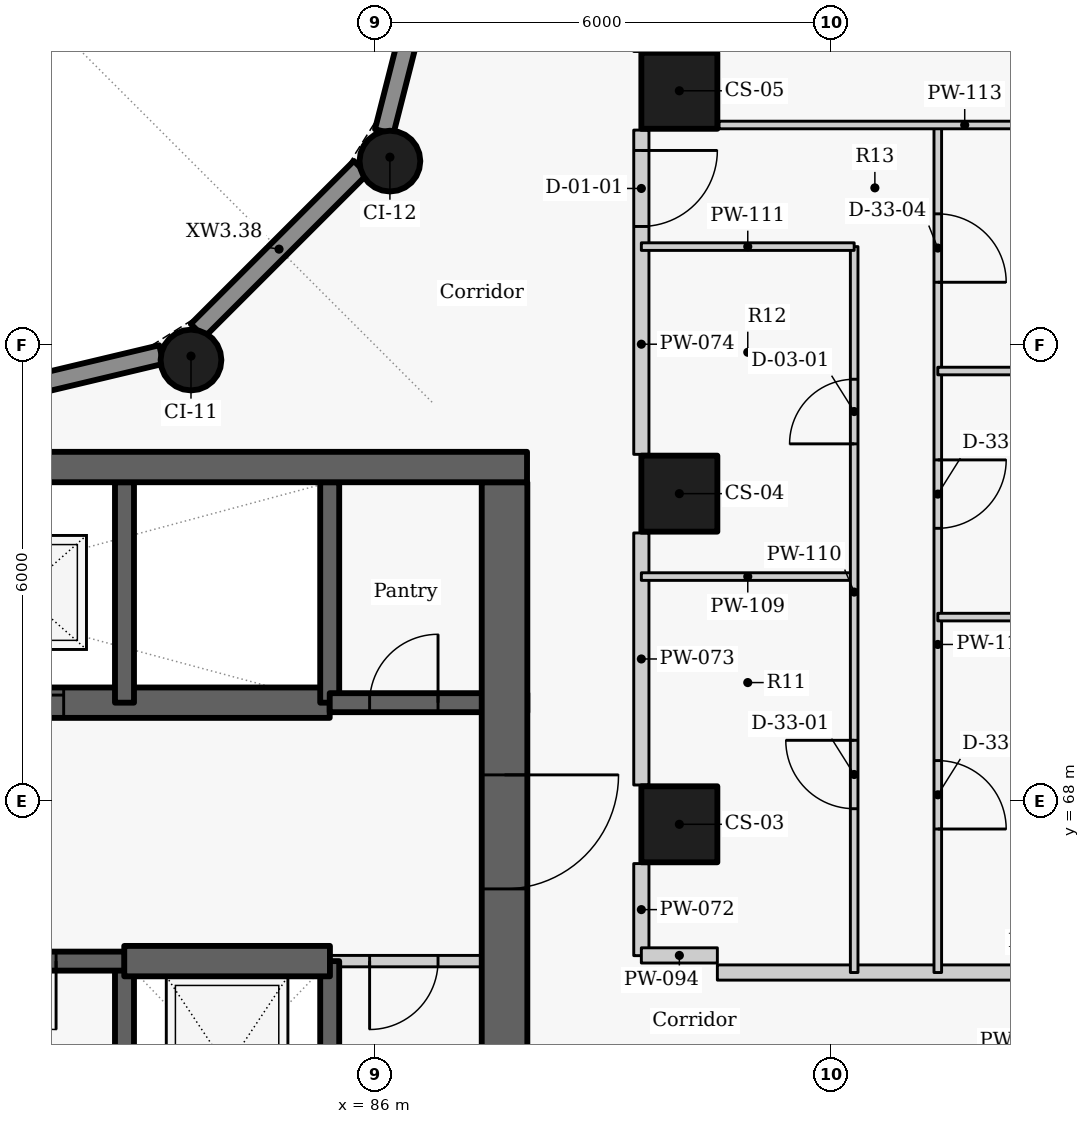
"""IFC4 building model, lengths in metres.
Left out: names, types, materials, properties, quantities, classifications, styles, units other than length and angle.
Written with IfcOpenShell. Run it as: python <this file> out.ifc"""

import sys

from ifc_helpers import new_model, si_unit, direction, frame, frame_2d, origin, origin_2d, place, context, subcontext, project, spatial, rectangle, circle, extrude, element, fill, save


model = new_model("IFC4")
c1 = context("Model", 3, precision=1e-05, world=origin(), true_north=direction((0.0, 1.0)))
c2 = subcontext(c1, "Body", "Model", "MODEL_VIEW")
j1 = project(units=[si_unit("LENGTHUNIT", "METRE"), si_unit("PLANEANGLEUNIT", "RADIAN")], contexts=[c1])
p1 = place(None, origin())
s1 = spatial("IfcSite", under=j1, at=p1, CompositionType="ELEMENT")
p2 = place(p1, origin())
s2 = spatial("IfcBuilding", under=s1, at=p2, CompositionType="ELEMENT")
p3 = place(p2, frame((0.0, 0.0, 107.4)))
s3 = spatial("IfcBuildingStorey", under=s2, at=p3, CompositionType="ELEMENT", Elevation=107.4)
for number, where, z_axis, x_axis in (
    (1, (90.0, 67.7, 0.0), (0.0, 0.0, 1.0), (0.0, 1.0, 0.0)),
    (2, (90.0, 72.05, 0.0), (0.0, 0.0, 1.0), (0.0, 1.0, 0.0)),
    (3, (90.0, 77.35, 0.0), (0.0, 0.0, 1.0), (0.0, 1.0, 0.0)),
):
    element("IfcColumn", number, at=place(p3, frame(where, z_axis=z_axis, x_axis=x_axis)), inside=s3, PredefinedType="COLUMN", context=c2, shape_type="SweptSolid", body=[
        extrude(rectangle(XDim=1.0, YDim=1.0, at=origin_2d()), origin(), (0.0, 0.0, 1.0), 3.3),
    ])
for number, where, z_axis, x_axis in (
    (4, (83.575, 73.808, 0.0), (0.0, 0.0, 1.0), (0.866, 0.5, 0.0)),
    (5, (86.192, 76.425, 0.0), (0.0, 0.0, 1.0), (0.5, 0.866, 0.0)),
):
    element("IfcColumn", number, at=place(p3, frame(where, z_axis=z_axis, x_axis=x_axis)), inside=s3, PredefinedType="COLUMN", context=c2, shape_type="SweptSolid", body=[
        extrude(circle(Radius=0.4, at=origin_2d()), origin(), (0.0, 0.0, 1.0), 3.3),
    ])
p4 = place(p3, frame((86.86, 79.73, 0.0), z_axis=(0.0, 0.0, 1.0), x_axis=(-0.247055971283, -0.969001211069, 0.0)))
e6 = element("IfcWall", 6, at=p4, inside=s3, PredefinedType="SOLIDWALL", context=c2, shape_type="SweptSolid", body=[
    extrude(rectangle(XDim=3.01, YDim=0.25, at=frame_2d((1.505, 0.0))), origin(), (0.0, 0.0, 1.0), 2.425),
])
p5 = place(p3, frame((85.806, 76.339, 0.0), z_axis=(0.0, 0.0, 1.0), x_axis=(-0.707106781187, -0.707106781187, 0.0)))
e7 = element("IfcWall", 7, at=p5, inside=s3, PredefinedType="SOLIDWALL", context=c2, shape_type="SweptSolid", body=[
    extrude(rectangle(XDim=3.033, YDim=0.25, at=frame_2d((1.517, 0.0))), origin(), (0.0, 0.0, 1.0), 2.425),
])
p6 = place(p3, frame((83.186, 73.881, 0.0), z_axis=(0.0, 0.0, 1.0), x_axis=(-0.972773113459, -0.231759508395, 0.0)))
e8 = element("IfcWall", 8, at=p6, inside=s3, PredefinedType="SOLIDWALL", context=c2, shape_type="SweptSolid", body=[
    extrude(rectangle(XDim=3.246, YDim=0.25, at=frame_2d((1.623, 0.0))), origin(), (0.0, 0.0, 1.0), 2.425),
])
p7 = place(p3, frame((74.6, 69.3, -0.275), z_axis=(0.0, 0.0, 1.0), x_axis=(1.0, 0.0, 0.0)))
e9 = element("IfcWall", 9, at=p7, inside=s3, PredefinedType="SHEAR", context=c2, shape_type="SweptSolid", body=[
    extrude(rectangle(XDim=10.8, YDim=0.4, at=frame_2d((5.4, 0.0))), origin(), (0.0, 0.0, 1.0), 3.3),
])
p8 = place(p7, frame((0.8, 0.0, 0.275)))
e10 = element("IfcOpeningElement", 10, at=p8, cuts=e9, PredefinedType="OPENING", context=c2, shape_type="SweptSolid", body=[
    extrude(rectangle(XDim=1.1, YDim=2.1, at=frame_2d((0.55, 1.05))), frame((0.0, 0.21, 0.0), z_axis=(0.0, -1.0, 0.0), x_axis=(1.0, 0.0, 0.0)), (0.0, 0.0, 1.0), 0.42),
])
p9 = place(p7, frame((3.5, 0.0, 0.275)))
e11 = element("IfcOpeningElement", 11, at=p9, cuts=e9, PredefinedType="OPENING", context=c2, shape_type="SweptSolid", body=[
    extrude(rectangle(XDim=1.1, YDim=2.1, at=frame_2d((0.55, 1.05))), frame((0.0, 0.21, 0.0), z_axis=(0.0, -1.0, 0.0), x_axis=(1.0, 0.0, 0.0)), (0.0, 0.0, 1.0), 0.42),
])
p10 = place(p7, frame((6.2, 0.0, 0.275)))
e12 = element("IfcOpeningElement", 12, at=p10, cuts=e9, PredefinedType="OPENING", context=c2, shape_type="SweptSolid", body=[
    extrude(rectangle(XDim=1.1, YDim=2.1, at=frame_2d((0.55, 1.05))), frame((0.0, 0.21, 0.0), z_axis=(0.0, -1.0, 0.0), x_axis=(1.0, 0.0, 0.0)), (0.0, 0.0, 1.0), 0.42),
])
p11 = place(p3, frame((82.7, 63.1, -0.275), z_axis=(0.0, 0.0, 1.0), x_axis=(0.0, 1.0, 0.0)))
e13 = element("IfcWall", 13, at=p11, inside=s3, PredefinedType="SHEAR", context=c2, shape_type="SweptSolid", body=[
    extrude(rectangle(XDim=2.8, YDim=0.25, at=frame_2d((1.4, 0.0))), origin(), (0.0, 0.0, 1.0), 3.3),
])
p12 = place(p3, frame((82.7, 69.3, -0.275), z_axis=(0.0, 0.0, 1.0), x_axis=(0.0, 1.0, 0.0)))
e14 = element("IfcWall", 14, at=p12, inside=s3, PredefinedType="SHEAR", context=c2, shape_type="SweptSolid", body=[
    extrude(rectangle(XDim=2.9, YDim=0.25, at=frame_2d((1.45, 0.0))), origin(), (0.0, 0.0, 1.0), 3.3),
])
p13 = place(p3, frame((85.4, 63.1, -0.275), z_axis=(0.0, 0.0, 1.0), x_axis=(0.0, 1.0, 0.0)))
e15 = element("IfcWall", 15, at=p13, inside=s3, PredefinedType="SHEAR", context=c2, shape_type="SweptSolid", body=[
    extrude(rectangle(XDim=2.8, YDim=0.25, at=frame_2d((1.4, 0.0))), origin(), (0.0, 0.0, 1.0), 3.3),
])
p14 = place(p3, frame((85.4, 69.3, -0.275), z_axis=(0.0, 0.0, 1.0), x_axis=(0.0, 1.0, 0.0)))
e16 = element("IfcWall", 16, at=p14, inside=s3, PredefinedType="SHEAR", context=c2, shape_type="SweptSolid", body=[
    extrude(rectangle(XDim=2.9, YDim=0.25, at=frame_2d((1.45, 0.0))), origin(), (0.0, 0.0, 1.0), 3.3),
])
p15 = place(p3, frame((85.4, 69.3, -0.275), z_axis=(0.0, 0.0, 1.0), x_axis=(1.0, 0.0, 0.0)))
e17 = element("IfcWall", 17, at=p15, inside=s3, PredefinedType="SHEAR", context=c2, shape_type="SweptSolid", body=[
    extrude(rectangle(XDim=2.6, YDim=0.25, at=frame_2d((1.3, 0.0))), origin(), (0.0, 0.0, 1.0), 3.3),
])
p16 = place(p15, frame((0.525, 0.0, 0.275)))
e18 = element("IfcOpeningElement", 18, at=p16, cuts=e17, PredefinedType="OPENING", context=c2, shape_type="SweptSolid", body=[
    extrude(rectangle(XDim=0.9, YDim=2.1, at=frame_2d((0.45, 1.05))), frame((0.0, 0.135, 0.0), z_axis=(0.0, -1.0, 0.0), x_axis=(1.0, 0.0, 0.0)), (0.0, 0.0, 1.0), 0.27),
])
p17 = place(p3, frame((87.7, 72.2, -0.275), z_axis=(0.0, 0.0, 1.0), x_axis=(0.0, -1.0, 0.0)))
e19 = element("IfcWall", 19, at=p17, inside=s3, PredefinedType="SHEAR", context=c2, shape_type="SweptSolid", body=[
    extrude(rectangle(XDim=15.6, YDim=0.6, at=frame_2d((7.8, 0.0))), origin(), (0.0, 0.0, 1.0), 3.3),
])
p18 = place(p17, frame((3.85, 0.0, 0.275)))
e20 = element("IfcOpeningElement", 20, at=p18, cuts=e19, PredefinedType="OPENING", context=c2, shape_type="SweptSolid", body=[
    extrude(rectangle(XDim=1.5, YDim=2.1, at=frame_2d((0.75, 1.05))), frame((0.0, 0.31, 0.0), z_axis=(0.0, -1.0, 0.0), x_axis=(1.0, 0.0, 0.0)), (0.0, 0.0, 1.0), 0.62),
])
p19 = place(p17, frame((11.8, 0.0, 0.275)))
e21 = element("IfcOpeningElement", 21, at=p19, cuts=e19, PredefinedType="OPENING", context=c2, shape_type="SweptSolid", body=[
    extrude(rectangle(XDim=1.1, YDim=2.1, at=frame_2d((0.55, 1.05))), frame((0.0, 0.31, 0.0), z_axis=(0.0, -1.0, 0.0), x_axis=(1.0, 0.0, 0.0)), (0.0, 0.0, 1.0), 0.62),
])
p20 = place(p3, frame((88.0, 65.9, 0.0), z_axis=(0.0, 0.0, 1.0), x_axis=(-1.0, 0.0, 0.0)))
e22 = element("IfcWall", 22, at=p20, inside=s3, PredefinedType="PARTITIONING", context=c2, shape_type="SweptSolid", body=[
    extrude(rectangle(XDim=2.603, YDim=0.15, at=frame_2d((1.302, 0.0))), origin(), (0.0, 0.0, 1.0), 3.025),
])
p21 = place(p20, frame((1.175, 0.0, 0.0)))
e23 = element("IfcOpeningElement", 23, at=p21, cuts=e22, PredefinedType="OPENING", context=c2, shape_type="SweptSolid", body=[
    extrude(rectangle(XDim=0.9, YDim=2.1, at=frame_2d((0.45, 1.05))), frame((0.0, 0.085, 0.0), z_axis=(0.0, -1.0, 0.0), x_axis=(1.0, 0.0, 0.0)), (0.0, 0.0, 1.0), 0.17),
])
p22 = place(p3, frame((82.703, 65.9, -0.275), z_axis=(0.0, 0.0, 1.0), x_axis=(-1.0, 0.0, 0.0)))
e24 = element("IfcWall", 24, at=p22, inside=s3, PredefinedType="SHEAR", context=c2, shape_type="SweptSolid", body=[
    extrude(rectangle(XDim=2.706, YDim=0.25, at=frame_2d((1.353, 0.0))), origin(), (0.0, 0.0, 1.0), 3.3),
])
p23 = place(p22, frame((0.903, 0.0, 0.275)))
e25 = element("IfcOpeningElement", 25, at=p23, cuts=e24, PredefinedType="OPENING", context=c2, shape_type="SweptSolid", body=[
    extrude(rectangle(XDim=0.9, YDim=2.1, at=frame_2d((0.45, 1.05))), frame((0.0, 0.135, 0.0), z_axis=(0.0, -1.0, 0.0), x_axis=(1.0, 0.0, 0.0)), (0.0, 0.0, 1.0), 0.27),
])
p24 = place(p3, frame((82.697, 65.9, -0.275), z_axis=(0.0, 0.0, 1.0), x_axis=(1.0, 0.0, 0.0)))
e26 = element("IfcWall", 26, at=p24, inside=s3, PredefinedType="SHEAR", context=c2, shape_type="SweptSolid", body=[
    extrude(rectangle(XDim=2.706, YDim=0.4, at=frame_2d((1.353, 0.0))), origin(), (0.0, 0.0, 1.0), 3.3),
])
p25 = place(p3, frame((89.5, 65.972, 0.0), z_axis=(0.0, 0.0, 1.0), x_axis=(0.0, 1.0, 0.0)))
e27 = element("IfcWall", 27, at=p25, inside=s3, PredefinedType="PARTITIONING", context=c2, shape_type="SweptSolid", body=[
    extrude(rectangle(XDim=1.211, YDim=0.2, at=frame_2d((0.605, 0.0))), origin(), (0.0, 0.0, 1.0), 3.025),
])
p26 = place(p3, frame((89.5, 68.217, 0.0), z_axis=(0.0, 0.0, 1.0), x_axis=(0.0, 1.0, 0.0)))
e28 = element("IfcWall", 28, at=p26, inside=s3, PredefinedType="PARTITIONING", context=c2, shape_type="SweptSolid", body=[
    extrude(rectangle(XDim=3.316, YDim=0.2, at=frame_2d((1.658, 0.0))), origin(), (0.0, 0.0, 1.0), 3.025),
])
p27 = place(p3, frame((89.5, 76.833, 0.0), z_axis=(0.0, 0.0, 1.0), x_axis=(0.0, -1.0, 0.0)))
e29 = element("IfcWall", 29, at=p27, inside=s3, PredefinedType="PARTITIONING", context=c2, shape_type="SweptSolid", body=[
    extrude(rectangle(XDim=4.266, YDim=0.2, at=frame_2d((2.133, 0.0))), origin(), (0.0, 0.0, 1.0), 3.025),
])
p28 = place(p27, frame((0.268, 0.0, 0.0)))
e30 = element("IfcOpeningElement", 30, at=p28, cuts=e29, PredefinedType="OPENING", context=c2, shape_type="SweptSolid", body=[
    extrude(rectangle(XDim=1.0, YDim=2.1, at=frame_2d((0.5, 1.05))), frame((0.0, 0.11, 0.0), z_axis=(0.0, -1.0, 0.0), x_axis=(1.0, 0.0, 0.0)), (0.0, 0.0, 1.0), 0.22),
])
p29 = place(p3, frame((89.5, 65.975, 0.0), z_axis=(0.0, 0.0, 1.0), x_axis=(1.0, 0.0, 0.0)))
e31 = element("IfcWall", 31, at=p29, inside=s3, PredefinedType="PARTITIONING", context=c2, shape_type="SweptSolid", body=[
    extrude(rectangle(XDim=1.0, YDim=0.2, at=frame_2d((0.5, 0.0))), origin(), (0.0, 0.0, 1.0), 2.505),
])
p30 = place(p3, frame((90.5, 65.75, 0.0), z_axis=(0.0, 0.0, 1.0), x_axis=(1.0, 0.0, 0.0)))
e32 = element("IfcWall", 32, at=p30, inside=s3, PredefinedType="PARTITIONING", context=c2, shape_type="SweptSolid", body=[
    extrude(rectangle(XDim=8.639, YDim=0.2, at=frame_2d((4.32, 0.0))), origin(), (0.0, 0.0, 1.0), 2.405),
])
p31 = place(p3, frame((89.5, 70.959, 0.0), z_axis=(0.0, 0.0, 1.0), x_axis=(1.0, 0.0, 0.0)))
e33 = element("IfcWall", 33, at=p31, inside=s3, PredefinedType="PARTITIONING", context=c2, shape_type="SweptSolid", body=[
    extrude(rectangle(XDim=2.8, YDim=0.1, at=frame_2d((1.4, 0.0))), origin(), (0.0, 0.0, 1.0), 2.505),
])
p32 = place(p3, frame((92.3, 65.75, 0.0), z_axis=(0.0, 0.0, 1.0), x_axis=(0.0, 1.0, 0.0)))
e34 = element("IfcWall", 34, at=p32, inside=s3, PredefinedType="PARTITIONING", context=c2, shape_type="SweptSolid", body=[
    extrude(rectangle(XDim=9.55, YDim=0.1, at=frame_2d((4.775, 0.0))), origin(), (0.0, 0.0, 1.0), 3.025),
])
p33 = place(p32, frame((2.155, 0.0, 0.0)))
e35 = element("IfcOpeningElement", 35, at=p33, cuts=e34, PredefinedType="OPENING", context=c2, shape_type="SweptSolid", body=[
    extrude(rectangle(XDim=0.9, YDim=2.1, at=frame_2d((0.45, 1.05))), frame((0.0, 0.06, 0.0), z_axis=(0.0, -1.0, 0.0), x_axis=(1.0, 0.0, 0.0)), (0.0, 0.0, 1.0), 0.12),
])
p34 = place(p32, frame((6.955, 0.0, 0.0)))
e36 = element("IfcOpeningElement", 36, at=p34, cuts=e34, PredefinedType="OPENING", context=c2, shape_type="SweptSolid", body=[
    extrude(rectangle(XDim=0.85, YDim=2.1, at=frame_2d((0.425, 1.05))), frame((0.0, 0.06, 0.0), z_axis=(0.0, -1.0, 0.0), x_axis=(1.0, 0.0, 0.0)), (0.0, 0.0, 1.0), 0.12),
])
p35 = place(p3, frame((89.5, 75.3, 0.0), z_axis=(0.0, 0.0, 1.0), x_axis=(1.0, 0.0, 0.0)))
e37 = element("IfcWall", 37, at=p35, inside=s3, PredefinedType="PARTITIONING", context=c2, shape_type="SweptSolid", body=[
    extrude(rectangle(XDim=2.8, YDim=0.1, at=frame_2d((1.4, 0.0))), origin(), (0.0, 0.0, 1.0), 2.505),
])
p36 = place(p3, frame((93.4, 76.9, 0.0), z_axis=(0.0, 0.0, 1.0), x_axis=(0.0, -1.0, 0.0)))
e38 = element("IfcWall", 38, at=p36, inside=s3, PredefinedType="PARTITIONING", context=c2, shape_type="SweptSolid", body=[
    extrude(rectangle(XDim=11.15, YDim=0.1, at=frame_2d((5.575, 0.0))), origin(), (0.0, 0.0, 1.0), 3.025),
])
p37 = place(p36, frame((8.362, 0.0, 0.0)))
e39 = element("IfcOpeningElement", 39, at=p37, cuts=e38, PredefinedType="OPENING", context=c2, shape_type="SweptSolid", body=[
    extrude(rectangle(XDim=0.9, YDim=2.1, at=frame_2d((0.45, 1.05))), frame((0.0, 0.06, 0.0), z_axis=(0.0, -1.0, 0.0), x_axis=(1.0, 0.0, 0.0)), (0.0, 0.0, 1.0), 0.12),
])
p38 = place(p36, frame((4.406, 0.0, 0.0)))
e40 = element("IfcOpeningElement", 40, at=p38, cuts=e38, PredefinedType="OPENING", context=c2, shape_type="SweptSolid", body=[
    extrude(rectangle(XDim=0.9, YDim=2.1, at=frame_2d((0.45, 1.05))), frame((0.0, 0.06, 0.0), z_axis=(0.0, -1.0, 0.0), x_axis=(1.0, 0.0, 0.0)), (0.0, 0.0, 1.0), 0.12),
])
p39 = place(p36, frame((1.169, 0.0, 0.0)))
e41 = element("IfcOpeningElement", 41, at=p39, cuts=e38, PredefinedType="OPENING", context=c2, shape_type="SweptSolid", body=[
    extrude(rectangle(XDim=0.9, YDim=2.1, at=frame_2d((0.45, 1.05))), frame((0.0, 0.06, 0.0), z_axis=(0.0, -1.0, 0.0), x_axis=(1.0, 0.0, 0.0)), (0.0, 0.0, 1.0), 0.12),
])
p40 = place(p3, frame((90.52, 76.9, 0.0), z_axis=(0.0, 0.0, 1.0), x_axis=(1.0, 0.0, 0.0)))
e42 = element("IfcWall", 42, at=p40, inside=s3, PredefinedType="PARTITIONING", context=c2, shape_type="SweptSolid", body=[
    extrude(rectangle(XDim=6.468, YDim=0.1, at=frame_2d((3.234, 0.0))), origin(), (0.0, 0.0, 1.0), 3.025),
])
p41 = place(p3, frame((93.4, 70.426, 0.0), z_axis=(0.0, 0.0, 1.0), x_axis=(1.0, 0.0, 0.0)))
e43 = element("IfcWall", 43, at=p41, inside=s3, PredefinedType="PARTITIONING", context=c2, shape_type="SweptSolid", body=[
    extrude(rectangle(XDim=8.439, YDim=0.1, at=frame_2d((4.219, 0.0))), origin(), (0.0, 0.0, 1.0), 2.405),
])
p42 = place(p3, frame((93.4, 73.663, 0.0), z_axis=(0.0, 0.0, 1.0), x_axis=(1.0, 0.0, 0.0)))
e44 = element("IfcWall", 44, at=p42, inside=s3, PredefinedType="PARTITIONING", context=c2, shape_type="SweptSolid", body=[
    extrude(rectangle(XDim=10.308, YDim=0.1, at=frame_2d((5.154, 0.0))), origin(), (0.0, 0.0, 1.0), 2.405),
])
p43 = place(p3, frame((72.004, 72.4, -0.275), z_axis=(0.0, 0.0, 1.0), x_axis=(1.0, 0.0, 0.0)))
e45 = element("IfcWall", 45, at=p43, inside=s3, PredefinedType="SHEAR", context=c2, shape_type="SweptSolid", body=[
    extrude(rectangle(XDim=15.992, YDim=0.4, at=frame_2d((7.996, 0.0))), origin(), (0.0, 0.0, 1.0), 3.3),
])
p44 = place(p10, origin())
e46 = element("IfcDoor", 46, at=p44, inside=s3, OperationType="SLIDING_TO_LEFT", PredefinedType="DOOR", context=c2, shape_type="SweptSolid", body=[
    extrude(rectangle(XDim=1.1, YDim=2.1, at=frame_2d((0.55, 1.05))), frame((0.0, 0.025, 0.0), z_axis=(0.0, -1.0, 0.0), x_axis=(1.0, 0.0, 0.0)), (0.0, 0.0, 1.0), 0.05),
])
fill(e12, e46)
p45 = place(p16, origin())
e47 = element("IfcDoor", 47, at=p45, inside=s3, OperationType="SINGLE_SWING_RIGHT", PredefinedType="DOOR", context=c2, shape_type="SweptSolid", body=[
    extrude(rectangle(XDim=0.9, YDim=2.1, at=frame_2d((0.45, 1.05))), frame((0.0, 0.025, 0.0), z_axis=(0.0, -1.0, 0.0), x_axis=(1.0, 0.0, 0.0)), (0.0, 0.0, 1.0), 0.05),
])
fill(e18, e47)
p46 = place(p23, origin())
e48 = element("IfcDoor", 48, at=p46, inside=s3, OperationType="SINGLE_SWING_LEFT", PredefinedType="DOOR", context=c2, shape_type="SweptSolid", body=[
    extrude(rectangle(XDim=0.9, YDim=2.1, at=frame_2d((0.45, 1.05))), frame((0.0, 0.025, 0.0), z_axis=(0.0, -1.0, 0.0), x_axis=(1.0, 0.0, 0.0)), (0.0, 0.0, 1.0), 0.05),
])
fill(e25, e48)
p47 = place(p21, origin())
e49 = element("IfcDoor", 49, at=p47, inside=s3, OperationType="SINGLE_SWING_RIGHT", PredefinedType="DOOR", context=c2, shape_type="SweptSolid", body=[
    extrude(rectangle(XDim=0.9, YDim=2.1, at=frame_2d((0.45, 1.05))), frame((0.0, 0.025, 0.0), z_axis=(0.0, -1.0, 0.0), x_axis=(1.0, 0.0, 0.0)), (0.0, 0.0, 1.0), 0.05),
])
fill(e23, e49)
p48 = place(p28, origin())
e50 = element("IfcDoor", 50, at=p48, inside=s3, OperationType="SINGLE_SWING_LEFT", PredefinedType="DOOR", context=c2, shape_type="SweptSolid", body=[
    extrude(rectangle(XDim=1.0, YDim=2.1, at=frame_2d((0.5, 1.05))), frame((0.0, 0.025, 0.0), z_axis=(0.0, -1.0, 0.0), x_axis=(1.0, 0.0, 0.0)), (0.0, 0.0, 1.0), 0.05),
])
fill(e30, e50)
p49 = place(p33, origin())
e51 = element("IfcDoor", 51, at=p49, inside=s3, OperationType="SINGLE_SWING_RIGHT", PredefinedType="DOOR", context=c2, shape_type="SweptSolid", body=[
    extrude(rectangle(XDim=0.9, YDim=2.1, at=frame_2d((0.45, 1.05))), frame((0.0, 0.025, 0.0), z_axis=(0.0, -1.0, 0.0), x_axis=(1.0, 0.0, 0.0)), (0.0, 0.0, 1.0), 0.05),
])
fill(e35, e51)
p50 = place(p34, origin())
e52 = element("IfcDoor", 52, at=p50, inside=s3, OperationType="SINGLE_SWING_LEFT", PredefinedType="DOOR", context=c2, shape_type="SweptSolid", body=[
    extrude(rectangle(XDim=0.85, YDim=2.1, at=frame_2d((0.425, 1.05))), frame((0.0, 0.025, 0.0), z_axis=(0.0, -1.0, 0.0), x_axis=(1.0, 0.0, 0.0)), (0.0, 0.0, 1.0), 0.05),
])
fill(e36, e52)
p51 = place(p37, origin())
e53 = element("IfcDoor", 53, at=p51, inside=s3, OperationType="SINGLE_SWING_RIGHT", PredefinedType="DOOR", context=c2, shape_type="SweptSolid", body=[
    extrude(rectangle(XDim=0.9, YDim=2.1, at=frame_2d((0.45, 1.05))), frame((0.0, 0.025, 0.0), z_axis=(0.0, -1.0, 0.0), x_axis=(1.0, 0.0, 0.0)), (0.0, 0.0, 1.0), 0.05),
])
fill(e39, e53)
p52 = place(p38, origin())
e54 = element("IfcDoor", 54, at=p52, inside=s3, OperationType="SINGLE_SWING_LEFT", PredefinedType="DOOR", context=c2, shape_type="SweptSolid", body=[
    extrude(rectangle(XDim=0.9, YDim=2.1, at=frame_2d((0.45, 1.05))), frame((0.0, 0.025, 0.0), z_axis=(0.0, -1.0, 0.0), x_axis=(1.0, 0.0, 0.0)), (0.0, 0.0, 1.0), 0.05),
])
fill(e40, e54)
p53 = place(p39, origin())
e55 = element("IfcDoor", 55, at=p53, inside=s3, OperationType="SINGLE_SWING_RIGHT", PredefinedType="DOOR", context=c2, shape_type="SweptSolid", body=[
    extrude(rectangle(XDim=0.9, YDim=2.1, at=frame_2d((0.45, 1.05))), frame((0.0, 0.025, 0.0), z_axis=(0.0, -1.0, 0.0), x_axis=(1.0, 0.0, 0.0)), (0.0, 0.0, 1.0), 0.05),
])
fill(e41, e55)
p54 = place(p18, origin())
e56 = element("IfcDoor", 56, at=p54, inside=s3, OperationType="DOUBLE_DOOR_SINGLE_SWING", PredefinedType="DOOR", context=c2, shape_type="SweptSolid", body=[
    extrude(rectangle(XDim=1.5, YDim=2.1, at=frame_2d((0.75, 1.05))), frame((0.0, 0.025, 0.0), z_axis=(0.0, -1.0, 0.0), x_axis=(1.0, 0.0, 0.0)), (0.0, 0.0, 1.0), 0.05),
])
fill(e20, e56)
save(model, sys.argv[1])
